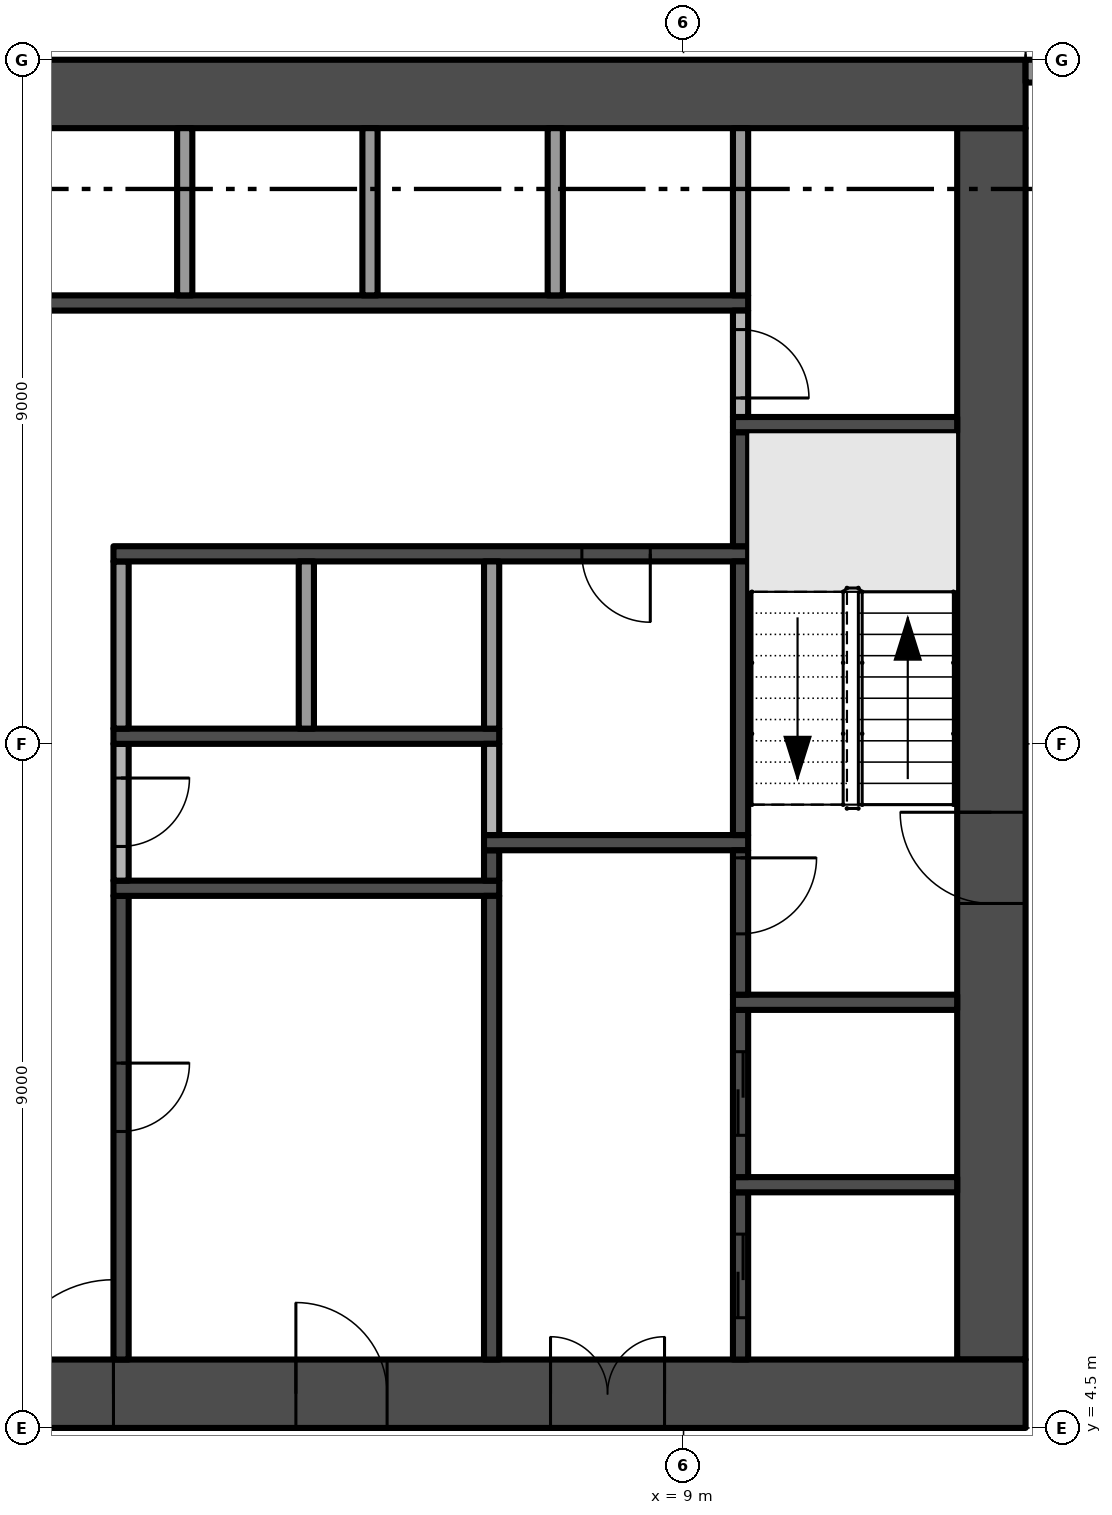
"""IFC4 building model, lengths in metres.
Left out: names, types, materials, properties, quantities, classifications, styles, units other than length and angle.
Written with IfcOpenShell. Run it as: python <this file> out.ifc"""

import sys

from ifc_helpers import new_model, si_unit, direction, frame, frame_2d, origin, place, context, subcontext, project, spatial, rectangle, extrude, element, fill, save


model = new_model("IFC4")
c1 = context("Model", 3, precision=1e-05, world=origin(), true_north=direction((0.0, 1.0)))
c2 = subcontext(c1, "Body", "Model", "MODEL_VIEW")
j1 = project(units=[si_unit("LENGTHUNIT", "METRE"), si_unit("PLANEANGLEUNIT", "RADIAN")], contexts=[c1])
p1 = place(None, origin())
s1 = spatial("IfcSite", under=j1, at=p1, CompositionType="ELEMENT")
p2 = place(p1, origin())
s2 = spatial("IfcBuilding", under=s1, at=p2, CompositionType="ELEMENT")
p3 = place(p2, frame((0.0, 0.0, 77.0)))
s3 = spatial("IfcBuildingStorey", under=s2, at=p3, CompositionType="ELEMENT", Elevation=77.0)
p4 = place(p3, frame((-13.5, 4.95, -0.3), z_axis=(0.0, 0.0, 1.0), x_axis=(1.0, 0.0, 0.0)))
e1 = element("IfcWall", 1, at=p4, inside=s3, PredefinedType="SHEAR", context=c2, shape_type="SweptSolid", body=[
    extrude(rectangle(XDim=27.0, YDim=0.9, at=frame_2d((13.5, 0.0))), origin(), (0.0, 0.0, 1.0), 3.8),
])
p5 = place(p4, frame((12.0, 0.0, 0.3)))
e2 = element("IfcOpeningElement", 2, at=p5, cuts=e1, PredefinedType="OPENING", context=c2, shape_type="SweptSolid", body=[
    extrude(rectangle(XDim=3.0, YDim=2.4, at=frame_2d((1.5, 1.2))), frame((0.0, 0.46, 0.0), z_axis=(0.0, -1.0, 0.0), x_axis=(1.0, 0.0, 0.0)), (0.0, 0.0, 1.0), 0.92),
])
p6 = place(p4, frame((4.9, 0.0, 0.3)))
e3 = element("IfcOpeningElement", 3, at=p6, cuts=e1, PredefinedType="OPENING", context=c2, shape_type="SweptSolid", body=[
    extrude(rectangle(XDim=1.2, YDim=2.2, at=frame_2d((0.6, 1.1))), frame((0.0, 0.46, 0.0), z_axis=(0.0, -1.0, 0.0), x_axis=(1.0, 0.0, 0.0)), (0.0, 0.0, 1.0), 0.92),
])
p7 = place(p4, frame((20.75, 0.0, 0.3)))
e4 = element("IfcOpeningElement", 4, at=p7, cuts=e1, PredefinedType="OPENING", context=c2, shape_type="SweptSolid", body=[
    extrude(rectangle(XDim=1.5, YDim=2.2, at=frame_2d((0.75, 1.1))), frame((0.0, 0.46, 0.0), z_axis=(0.0, -1.0, 0.0), x_axis=(1.0, 0.0, 0.0)), (0.0, 0.0, 1.0), 0.92),
])
p8 = place(p4, frame((17.4, 0.0, 0.3)))
e5 = element("IfcOpeningElement", 5, at=p8, cuts=e1, PredefinedType="OPENING", context=c2, shape_type="SweptSolid", body=[
    extrude(rectangle(XDim=1.2, YDim=2.2, at=frame_2d((0.6, 1.1))), frame((0.0, 0.46, 0.0), z_axis=(0.0, -1.0, 0.0), x_axis=(1.0, 0.0, 0.0)), (0.0, 0.0, 1.0), 0.92),
])
p9 = place(p3, frame((13.05, 5.4, -0.3), z_axis=(0.0, 0.0, 1.0), x_axis=(0.0, 1.0, 0.0)))
e6 = element("IfcWall", 6, at=p9, inside=s3, PredefinedType="SHEAR", context=c2, shape_type="SweptSolid", body=[
    extrude(rectangle(XDim=16.2, YDim=0.9, at=frame_2d((8.1, 0.0))), origin(), (0.0, 0.0, 1.0), 3.8),
])
p10 = place(p9, frame((6.0, 0.0, 0.3)))
e7 = element("IfcOpeningElement", 7, at=p10, cuts=e6, PredefinedType="OPENING", context=c2, shape_type="SweptSolid", body=[
    extrude(rectangle(XDim=1.2, YDim=2.2, at=frame_2d((0.6, 1.1))), frame((0.0, 0.46, 0.0), z_axis=(0.0, -1.0, 0.0), x_axis=(1.0, 0.0, 0.0)), (0.0, 0.0, 1.0), 0.92),
])
p11 = place(p3, frame((13.5, 22.05, -0.3), z_axis=(0.0, 0.0, 1.0), x_axis=(-1.0, 0.0, 0.0)))
e8 = element("IfcWall", 8, at=p11, inside=s3, PredefinedType="SHEAR", context=c2, shape_type="SweptSolid", body=[
    extrude(rectangle(XDim=27.0, YDim=0.9, at=frame_2d((13.5, 0.0))), origin(), (0.0, 0.0, 1.0), 3.8),
])
p12 = place(p3, frame((13.5, 22.35, 0.0), z_axis=(0.0, 0.0, 1.0), x_axis=(1.0, 0.0, 0.0)))
e9 = element("IfcWall", 9, at=p12, inside=s3, PredefinedType="SOLIDWALL", context=c2, shape_type="SweptSolid", body=[
    extrude(rectangle(XDim=3.825, YDim=0.3, at=frame_2d((1.913, 0.0))), origin(), (0.0, 0.0, 1.0), 3.5),
])
p13 = place(p12, frame((0.775, 0.0, 0.45)))
e10 = element("IfcOpeningElement", 10, at=p13, cuts=e9, PredefinedType="OPENING", context=c2, shape_type="SweptSolid", body=[
    extrude(rectangle(XDim=2.725, YDim=2.65, at=frame_2d((1.363, 1.325))), frame((0.0, 0.16, 0.0), z_axis=(0.0, -1.0, 0.0), x_axis=(1.0, 0.0, 0.0)), (0.0, 0.0, 1.0), 0.32),
])
p14 = place(p3, frame((-9.85, 19.3, 0.0), z_axis=(0.0, 0.0, 1.0), x_axis=(1.0, 0.0, 0.0)))
e11 = element("IfcWall", 11, at=p14, inside=s3, PredefinedType="SHEAR", context=c2, shape_type="SweptSolid", body=[
    extrude(rectangle(XDim=19.7, YDim=0.2, at=frame_2d((9.85, 0.0))), origin(), (0.0, 0.0, 1.0), 3.5),
])
p15 = place(p14, frame((0.769, 0.0, 0.0)))
e12 = element("IfcOpeningElement", 12, at=p15, cuts=e11, PredefinedType="OPENING", context=c2, shape_type="SweptSolid", body=[
    extrude(rectangle(XDim=1.1, YDim=2.1, at=frame_2d((0.55, 1.05))), frame((0.0, 0.11, 0.0), z_axis=(0.0, -1.0, 0.0), x_axis=(1.0, 0.0, 0.0)), (0.0, 0.0, 1.0), 0.22),
])
p16 = place(p14, frame((3.206, 0.0, 0.0)))
e13 = element("IfcOpeningElement", 13, at=p16, cuts=e11, PredefinedType="OPENING", context=c2, shape_type="SweptSolid", body=[
    extrude(rectangle(XDim=1.1, YDim=2.1, at=frame_2d((0.55, 1.05))), frame((0.0, 0.11, 0.0), z_axis=(0.0, -1.0, 0.0), x_axis=(1.0, 0.0, 0.0)), (0.0, 0.0, 1.0), 0.22),
])
p17 = place(p14, frame((5.644, 0.0, 0.0)))
e14 = element("IfcOpeningElement", 14, at=p17, cuts=e11, PredefinedType="OPENING", context=c2, shape_type="SweptSolid", body=[
    extrude(rectangle(XDim=1.1, YDim=2.1, at=frame_2d((0.55, 1.05))), frame((0.0, 0.11, 0.0), z_axis=(0.0, -1.0, 0.0), x_axis=(1.0, 0.0, 0.0)), (0.0, 0.0, 1.0), 0.22),
])
p18 = place(p14, frame((8.081, 0.0, 0.0)))
e15 = element("IfcOpeningElement", 15, at=p18, cuts=e11, PredefinedType="OPENING", context=c2, shape_type="SweptSolid", body=[
    extrude(rectangle(XDim=1.1, YDim=2.1, at=frame_2d((0.55, 1.05))), frame((0.0, 0.11, 0.0), z_axis=(0.0, -1.0, 0.0), x_axis=(1.0, 0.0, 0.0)), (0.0, 0.0, 1.0), 0.22),
])
p19 = place(p3, frame((1.6, 11.5, 0.0), z_axis=(0.0, 0.0, 1.0), x_axis=(0.0, -1.0, 0.0)))
e16 = element("IfcWall", 16, at=p19, inside=s3, PredefinedType="SHEAR", context=c2, shape_type="SweptSolid", body=[
    extrude(rectangle(XDim=6.1, YDim=0.2, at=frame_2d((3.05, 0.0))), origin(), (0.0, 0.0, 1.0), 3.5),
])
p20 = place(p19, frame((2.2, 0.0, 0.0)))
e17 = element("IfcOpeningElement", 17, at=p20, cuts=e16, PredefinedType="OPENING", context=c2, shape_type="SweptSolid", body=[
    extrude(rectangle(XDim=0.9, YDim=2.1, at=frame_2d((0.45, 1.05))), frame((0.0, 0.11, 0.0), z_axis=(0.0, -1.0, 0.0), x_axis=(1.0, 0.0, 0.0)), (0.0, 0.0, 1.0), 0.22),
])
p21 = place(p3, frame((1.5, 11.6, 0.0), z_axis=(0.0, 0.0, 1.0), x_axis=(1.0, 0.0, 0.0)))
e18 = element("IfcWall", 18, at=p21, inside=s3, PredefinedType="SHEAR", context=c2, shape_type="SweptSolid", body=[
    extrude(rectangle(XDim=5.075, YDim=0.2, at=frame_2d((2.538, 0.0))), origin(), (0.0, 0.0, 1.0), 3.5),
])
p22 = place(p3, frame((1.6, 13.5, 0.0), z_axis=(0.0, 0.0, 1.0), x_axis=(0.0, -1.0, 0.0)))
e19 = element("IfcWall", 19, at=p22, inside=s3, PredefinedType="PARTITIONING", context=c2, shape_type="SweptSolid", body=[
    extrude(rectangle(XDim=1.8, YDim=0.2, at=frame_2d((0.9, 0.0))), origin(), (0.0, 0.0, 1.0), 3.5),
])
p23 = place(p22, frame((0.45, 0.0, 0.0)))
e20 = element("IfcOpeningElement", 20, at=p23, cuts=e19, PredefinedType="OPENING", context=c2, shape_type="SweptSolid", body=[
    extrude(rectangle(XDim=0.9, YDim=2.1, at=frame_2d((0.45, 1.05))), frame((0.0, 0.11, 0.0), z_axis=(0.0, -1.0, 0.0), x_axis=(1.0, 0.0, 0.0)), (0.0, 0.0, 1.0), 0.22),
])
p24 = place(p3, frame((1.5, 13.6, 0.0), z_axis=(0.0, 0.0, 1.0), x_axis=(1.0, 0.0, 0.0)))
e21 = element("IfcWall", 21, at=p24, inside=s3, PredefinedType="SHEAR", context=c2, shape_type="SweptSolid", body=[
    extrude(rectangle(XDim=5.075, YDim=0.2, at=frame_2d((2.538, 0.0))), origin(), (0.0, 0.0, 1.0), 3.5),
])
p25 = place(p3, frame((1.6, 13.7, 0.0), z_axis=(0.0, 0.0, 1.0), x_axis=(0.0, 1.0, 0.0)))
e22 = element("IfcWall", 22, at=p25, inside=s3, PredefinedType="PARTITIONING", context=c2, shape_type="SweptSolid", body=[
    extrude(rectangle(XDim=2.2, YDim=0.2, at=frame_2d((1.1, 0.0))), origin(), (0.0, 0.0, 1.0), 3.5),
])
p26 = place(p3, frame((9.85, 16.0, 0.0), z_axis=(0.0, 0.0, 1.0), x_axis=(-1.0, 0.0, 0.0)))
e23 = element("IfcWall", 23, at=p26, inside=s3, PredefinedType="SHEAR", context=c2, shape_type="SweptSolid", body=[
    extrude(rectangle(XDim=8.35, YDim=0.2, at=frame_2d((4.175, 0.0))), origin(), (0.0, 0.0, 1.0), 3.5),
])
p27 = place(p26, frame((1.288, 0.0, 0.0)))
e24 = element("IfcOpeningElement", 24, at=p27, cuts=e23, PredefinedType="OPENING", context=c2, shape_type="SweptSolid", body=[
    extrude(rectangle(XDim=0.9, YDim=2.1, at=frame_2d((0.45, 1.05))), frame((0.0, 0.11, 0.0), z_axis=(0.0, -1.0, 0.0), x_axis=(1.0, 0.0, 0.0)), (0.0, 0.0, 1.0), 0.22),
])
for number, where, z_axis, x_axis in (
    (25, (2.438, 19.4, 0.0), (0.0, 0.0, 1.0), (0.0, 1.0, 0.0)),
    (26, (4.037, 13.7, 0.0), (0.0, 0.0, 1.0), (0.0, 1.0, 0.0)),
    (27, (4.875, 19.4, 0.0), (0.0, 0.0, 1.0), (0.0, 1.0, 0.0)),
):
    element("IfcWall", number, at=place(p3, frame(where, z_axis=z_axis, x_axis=x_axis)), inside=s3, PredefinedType="PARTITIONING", context=c2, shape_type="SweptSolid", body=[
        extrude(rectangle(XDim=2.2, YDim=0.2, at=frame_2d((1.1, 0.0))), origin(), (0.0, 0.0, 1.0), 3.5),
    ])
p28 = place(p3, frame((6.475, 5.4, 0.0), z_axis=(0.0, 0.0, 1.0), x_axis=(0.0, 1.0, 0.0)))
e28 = element("IfcWall", 28, at=p28, inside=s3, PredefinedType="SHEAR", context=c2, shape_type="SweptSolid", body=[
    extrude(rectangle(XDim=6.1, YDim=0.2, at=frame_2d((3.05, 0.0))), origin(), (0.0, 0.0, 1.0), 3.5),
])
p29 = place(p3, frame((6.475, 11.7, 0.0), z_axis=(0.0, 0.0, 1.0), x_axis=(0.0, 1.0, 0.0)))
e29 = element("IfcWall", 29, at=p29, inside=s3, PredefinedType="SHEAR", context=c2, shape_type="SweptSolid", body=[
    extrude(rectangle(XDim=0.4, YDim=0.2, at=frame_2d((0.2, 0.0))), origin(), (0.0, 0.0, 1.0), 3.5),
])
p30 = place(p3, frame((6.375, 12.2, 0.0), z_axis=(0.0, 0.0, 1.0), x_axis=(1.0, 0.0, 0.0)))
e30 = element("IfcWall", 30, at=p30, inside=s3, PredefinedType="SHEAR", context=c2, shape_type="SweptSolid", body=[
    extrude(rectangle(XDim=3.475, YDim=0.2, at=frame_2d((1.738, 0.0))), origin(), (0.0, 0.0, 1.0), 3.5),
])
p31 = place(p3, frame((6.475, 12.3, 0.0), z_axis=(0.0, 0.0, 1.0), x_axis=(0.0, 1.0, 0.0)))
e31 = element("IfcWall", 31, at=p31, inside=s3, PredefinedType="PARTITIONING", context=c2, shape_type="SweptSolid", body=[
    extrude(rectangle(XDim=1.2, YDim=0.2, at=frame_2d((0.6, 0.0))), origin(), (0.0, 0.0, 1.0), 3.5),
])
for number, where, z_axis, x_axis in (
    (32, (6.475, 13.7, 0.0), (0.0, 0.0, 1.0), (0.0, 1.0, 0.0)),
    (33, (7.312, 19.4, 0.0), (0.0, 0.0, 1.0), (0.0, 1.0, 0.0)),
):
    element("IfcWall", number, at=place(p3, frame(where, z_axis=z_axis, x_axis=x_axis)), inside=s3, PredefinedType="PARTITIONING", context=c2, shape_type="SweptSolid", body=[
        extrude(rectangle(XDim=2.2, YDim=0.2, at=frame_2d((1.1, 0.0))), origin(), (0.0, 0.0, 1.0), 3.5),
    ])
p32 = place(p3, frame((9.75, 5.4, 0.0), z_axis=(0.0, 0.0, 1.0), x_axis=(0.0, 1.0, 0.0)))
e34 = element("IfcWall", 34, at=p32, inside=s3, PredefinedType="SHEAR", context=c2, shape_type="SweptSolid", body=[
    extrude(rectangle(XDim=2.2, YDim=0.2, at=frame_2d((1.1, 0.0))), origin(), (0.0, 0.0, 1.0), 3.5),
])
p33 = place(p32, frame((0.55, 0.0, 0.0)))
e35 = element("IfcOpeningElement", 35, at=p33, cuts=e34, PredefinedType="OPENING", context=c2, shape_type="SweptSolid", body=[
    extrude(rectangle(XDim=1.1, YDim=2.1, at=frame_2d((0.55, 1.05))), frame((0.0, 0.11, 0.0), z_axis=(0.0, -1.0, 0.0), x_axis=(1.0, 0.0, 0.0)), (0.0, 0.0, 1.0), 0.22),
])
p34 = place(p3, frame((9.65, 7.7, 0.0), z_axis=(0.0, 0.0, 1.0), x_axis=(1.0, 0.0, 0.0)))
e36 = element("IfcWall", 36, at=p34, inside=s3, PredefinedType="SHEAR", context=c2, shape_type="SweptSolid", body=[
    extrude(rectangle(XDim=2.95, YDim=0.2, at=frame_2d((1.475, 0.0))), origin(), (0.0, 0.0, 1.0), 3.5),
])
p35 = place(p3, frame((9.75, 7.8, 0.0), z_axis=(0.0, 0.0, 1.0), x_axis=(0.0, 1.0, 0.0)))
e37 = element("IfcWall", 37, at=p35, inside=s3, PredefinedType="SHEAR", context=c2, shape_type="SweptSolid", body=[
    extrude(rectangle(XDim=2.2, YDim=0.2, at=frame_2d((1.1, 0.0))), origin(), (0.0, 0.0, 1.0), 3.5),
])
p36 = place(p35, frame((0.55, 0.0, 0.0)))
e38 = element("IfcOpeningElement", 38, at=p36, cuts=e37, PredefinedType="OPENING", context=c2, shape_type="SweptSolid", body=[
    extrude(rectangle(XDim=1.1, YDim=2.1, at=frame_2d((0.55, 1.05))), frame((0.0, 0.11, 0.0), z_axis=(0.0, -1.0, 0.0), x_axis=(1.0, 0.0, 0.0)), (0.0, 0.0, 1.0), 0.22),
])
p37 = place(p3, frame((9.65, 10.1, 0.0), z_axis=(0.0, 0.0, 1.0), x_axis=(1.0, 0.0, 0.0)))
e39 = element("IfcWall", 39, at=p37, inside=s3, PredefinedType="SHEAR", context=c2, shape_type="SweptSolid", body=[
    extrude(rectangle(XDim=2.95, YDim=0.2, at=frame_2d((1.475, 0.0))), origin(), (0.0, 0.0, 1.0), 3.5),
])
p38 = place(p3, frame((9.75, 12.1, 0.0), z_axis=(0.0, 0.0, 1.0), x_axis=(0.0, -1.0, 0.0)))
e40 = element("IfcWall", 40, at=p38, inside=s3, PredefinedType="SHEAR", context=c2, shape_type="SweptSolid", body=[
    extrude(rectangle(XDim=1.9, YDim=0.2, at=frame_2d((0.95, 0.0))), origin(), (0.0, 0.0, 1.0), 3.5),
])
p39 = place(p38, frame((0.1, 0.0, 0.0)))
e41 = element("IfcOpeningElement", 41, at=p39, cuts=e40, PredefinedType="OPENING", context=c2, shape_type="SweptSolid", body=[
    extrude(rectangle(XDim=1.0, YDim=2.2, at=frame_2d((0.5, 1.1))), frame((0.0, 0.11, 0.0), z_axis=(0.0, -1.0, 0.0), x_axis=(1.0, 0.0, 0.0)), (0.0, 0.0, 1.0), 0.22),
])
p40 = place(p3, frame((9.75, 12.3, 0.0), z_axis=(0.0, 0.0, 1.0), x_axis=(0.0, 1.0, 0.0)))
e42 = element("IfcWall", 42, at=p40, inside=s3, PredefinedType="SHEAR", context=c2, shape_type="SweptSolid", body=[
    extrude(rectangle(XDim=3.6, YDim=0.2, at=frame_2d((1.8, 0.0))), origin(), (0.0, 0.0, 1.0), 3.5),
])
p41 = place(p3, frame((9.75, 16.1, 0.0), z_axis=(0.0, 0.0, 1.0), x_axis=(0.0, 1.0, 0.0)))
e43 = element("IfcWall", 43, at=p41, inside=s3, PredefinedType="SHEAR", context=c2, shape_type="SweptSolid", body=[
    extrude(rectangle(XDim=1.5, YDim=0.2, at=frame_2d((0.75, 0.0))), origin(), (0.0, 0.0, 1.0), 3.5),
])
p42 = place(p3, frame((9.65, 17.7, 0.0), z_axis=(0.0, 0.0, 1.0), x_axis=(1.0, 0.0, 0.0)))
e44 = element("IfcWall", 44, at=p42, inside=s3, PredefinedType="SHEAR", context=c2, shape_type="SweptSolid", body=[
    extrude(rectangle(XDim=2.95, YDim=0.2, at=frame_2d((1.475, 0.0))), origin(), (0.0, 0.0, 1.0), 3.5),
])
p43 = place(p3, frame((9.75, 19.2, 0.0), z_axis=(0.0, 0.0, 1.0), x_axis=(0.0, -1.0, 0.0)))
e45 = element("IfcWall", 45, at=p43, inside=s3, PredefinedType="PARTITIONING", context=c2, shape_type="SweptSolid", body=[
    extrude(rectangle(XDim=1.4, YDim=0.2, at=frame_2d((0.7, 0.0))), origin(), (0.0, 0.0, 1.0), 3.5),
])
p44 = place(p43, frame((0.25, 0.0, 0.0)))
e46 = element("IfcOpeningElement", 46, at=p44, cuts=e45, PredefinedType="OPENING", context=c2, shape_type="SweptSolid", body=[
    extrude(rectangle(XDim=0.9, YDim=2.1, at=frame_2d((0.45, 1.05))), frame((0.0, 0.11, 0.0), z_axis=(0.0, -1.0, 0.0), x_axis=(1.0, 0.0, 0.0)), (0.0, 0.0, 1.0), 0.22),
])
p45 = place(p3, frame((9.75, 19.4, 0.0), z_axis=(0.0, 0.0, 1.0), x_axis=(0.0, 1.0, 0.0)))
e47 = element("IfcWall", 47, at=p45, inside=s3, PredefinedType="PARTITIONING", context=c2, shape_type="SweptSolid", body=[
    extrude(rectangle(XDim=2.2, YDim=0.2, at=frame_2d((1.1, 0.0))), origin(), (0.0, 0.0, 1.0), 3.5),
])
p46 = place(p5, frame((3.0, 0.0, 0.0), z_axis=(0.0, 0.0, 1.0), x_axis=(-1.0, 0.0, 0.0)))
e48 = element("IfcDoor", 48, at=p46, inside=s3, OperationType="DOUBLE_DOOR_SINGLE_SWING", PredefinedType="DOOR", context=c2, shape_type="SweptSolid", body=[
    extrude(rectangle(XDim=3.0, YDim=2.4, at=frame_2d((1.5, 1.2))), frame((0.0, 0.025, 0.0), z_axis=(0.0, -1.0, 0.0), x_axis=(1.0, 0.0, 0.0)), (0.0, 0.0, 1.0), 0.05),
])
fill(e2, e48)
p47 = place(p10, frame((1.2, 0.0, 0.0), z_axis=(0.0, 0.0, 1.0), x_axis=(-1.0, 0.0, 0.0)))
e49 = element("IfcDoor", 49, at=p47, inside=s3, OperationType="SINGLE_SWING_LEFT", PredefinedType="DOOR", context=c2, shape_type="SweptSolid", body=[
    extrude(rectangle(XDim=1.2, YDim=2.2, at=frame_2d((0.6, 1.1))), frame((0.0, 0.025, 0.0), z_axis=(0.0, -1.0, 0.0), x_axis=(1.0, 0.0, 0.0)), (0.0, 0.0, 1.0), 0.05),
])
fill(e7, e49)
p48 = place(p7, frame((1.5, 0.0, 0.0), z_axis=(0.0, 0.0, 1.0), x_axis=(-1.0, 0.0, 0.0)))
e50 = element("IfcDoor", 50, at=p48, inside=s3, OperationType="DOUBLE_DOOR_SINGLE_SWING", PredefinedType="DOOR", context=c2, shape_type="SweptSolid", body=[
    extrude(rectangle(XDim=1.5, YDim=2.2, at=frame_2d((0.75, 1.1))), frame((0.0, 0.025, 0.0), z_axis=(0.0, -1.0, 0.0), x_axis=(1.0, 0.0, 0.0)), (0.0, 0.0, 1.0), 0.05),
])
fill(e4, e50)
p49 = place(p8, frame((1.2, 0.0, 0.0), z_axis=(0.0, 0.0, 1.0), x_axis=(-1.0, 0.0, 0.0)))
e51 = element("IfcDoor", 51, at=p49, inside=s3, OperationType="SINGLE_SWING_RIGHT", PredefinedType="DOOR", context=c2, shape_type="SweptSolid", body=[
    extrude(rectangle(XDim=1.2, YDim=2.2, at=frame_2d((0.6, 1.1))), frame((0.0, 0.025, 0.0), z_axis=(0.0, -1.0, 0.0), x_axis=(1.0, 0.0, 0.0)), (0.0, 0.0, 1.0), 0.05),
])
fill(e5, e51)
p50 = place(p39, origin())
e52 = element("IfcDoor", 52, at=p50, inside=s3, OperationType="SINGLE_SWING_LEFT", PredefinedType="DOOR", context=c2, shape_type="SweptSolid", body=[
    extrude(rectangle(XDim=1.0, YDim=2.2, at=frame_2d((0.5, 1.1))), frame((0.0, 0.025, 0.0), z_axis=(0.0, -1.0, 0.0), x_axis=(1.0, 0.0, 0.0)), (0.0, 0.0, 1.0), 0.05),
])
fill(e41, e52)
p51 = place(p33, origin())
e53 = element("IfcDoor", 53, at=p51, inside=s3, OperationType="SLIDING_TO_RIGHT", PredefinedType="DOOR", context=c2, shape_type="SweptSolid", body=[
    extrude(rectangle(XDim=1.1, YDim=2.1, at=frame_2d((0.55, 1.05))), frame((0.0, 0.025, 0.0), z_axis=(0.0, -1.0, 0.0), x_axis=(1.0, 0.0, 0.0)), (0.0, 0.0, 1.0), 0.05),
])
fill(e35, e53)
p52 = place(p36, origin())
e54 = element("IfcDoor", 54, at=p52, inside=s3, OperationType="SLIDING_TO_RIGHT", PredefinedType="DOOR", context=c2, shape_type="SweptSolid", body=[
    extrude(rectangle(XDim=1.1, YDim=2.1, at=frame_2d((0.55, 1.05))), frame((0.0, 0.025, 0.0), z_axis=(0.0, -1.0, 0.0), x_axis=(1.0, 0.0, 0.0)), (0.0, 0.0, 1.0), 0.05),
])
fill(e38, e54)
p53 = place(p20, origin())
e55 = element("IfcDoor", 55, at=p53, inside=s3, OperationType="SINGLE_SWING_LEFT", PredefinedType="DOOR", context=c2, shape_type="SweptSolid", body=[
    extrude(rectangle(XDim=0.9, YDim=2.1, at=frame_2d((0.45, 1.05))), frame((0.0, 0.025, 0.0), z_axis=(0.0, -1.0, 0.0), x_axis=(1.0, 0.0, 0.0)), (0.0, 0.0, 1.0), 0.05),
])
fill(e17, e55)
p54 = place(p23, origin())
e56 = element("IfcDoor", 56, at=p54, inside=s3, OperationType="SINGLE_SWING_LEFT", PredefinedType="DOOR", context=c2, shape_type="SweptSolid", body=[
    extrude(rectangle(XDim=0.9, YDim=2.1, at=frame_2d((0.45, 1.05))), frame((0.0, 0.025, 0.0), z_axis=(0.0, -1.0, 0.0), x_axis=(1.0, 0.0, 0.0)), (0.0, 0.0, 1.0), 0.05),
])
fill(e20, e56)
p55 = place(p27, origin())
e57 = element("IfcDoor", 57, at=p55, inside=s3, OperationType="SINGLE_SWING_LEFT", PredefinedType="DOOR", context=c2, shape_type="SweptSolid", body=[
    extrude(rectangle(XDim=0.9, YDim=2.1, at=frame_2d((0.45, 1.05))), frame((0.0, 0.025, 0.0), z_axis=(0.0, -1.0, 0.0), x_axis=(1.0, 0.0, 0.0)), (0.0, 0.0, 1.0), 0.05),
])
fill(e24, e57)
p56 = place(p44, origin())
e58 = element("IfcDoor", 58, at=p56, inside=s3, OperationType="SINGLE_SWING_RIGHT", PredefinedType="DOOR", context=c2, shape_type="SweptSolid", body=[
    extrude(rectangle(XDim=0.9, YDim=2.1, at=frame_2d((0.45, 1.05))), frame((0.0, 0.025, 0.0), z_axis=(0.0, -1.0, 0.0), x_axis=(1.0, 0.0, 0.0)), (0.0, 0.0, 1.0), 0.05),
])
fill(e46, e58)
save(model, sys.argv[1])
